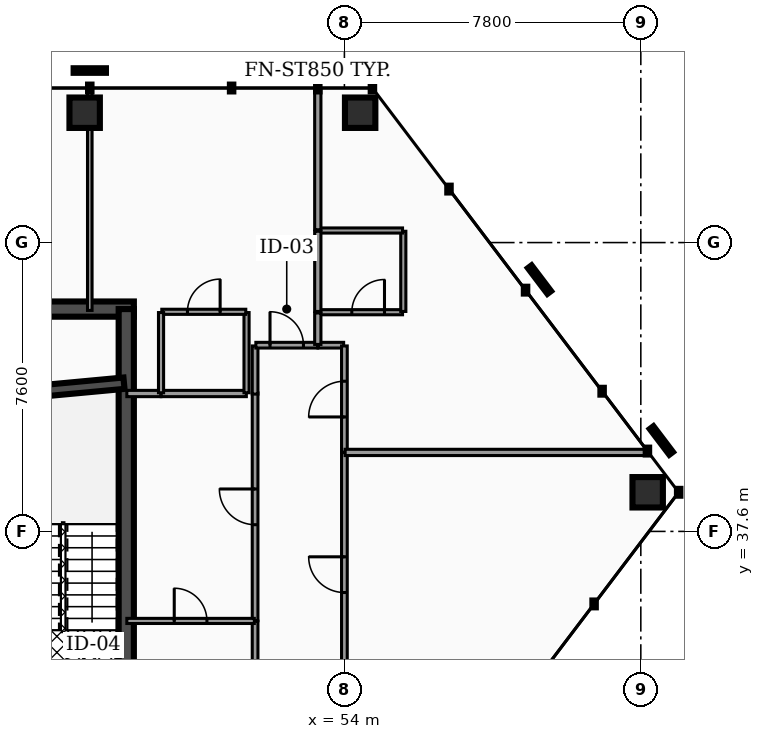
"""IFC4 building model, lengths in metres.
Left out: names, types, materials, properties, quantities, classifications, styles, units other than length and angle.
Written with IfcOpenShell. Run it as: python <this file> out.ifc"""

import sys

from ifc_helpers import new_model, si_unit, direction, frame, frame_2d, origin, origin_2d, place, context, subcontext, project, spatial, rectangle, hollow_rectangle, extrude, element, fill, save


model = new_model("IFC4")
c1 = context("Model", 3, precision=1e-05, world=origin(), true_north=direction((0.0, 1.0)))
c2 = subcontext(c1, "Body", "Model", "MODEL_VIEW")
j1 = project(units=[si_unit("LENGTHUNIT", "METRE"), si_unit("PLANEANGLEUNIT", "RADIAN")], contexts=[c1])
p1 = place(None, origin())
s1 = spatial("IfcSite", under=j1, at=p1, CompositionType="ELEMENT")
p2 = place(p1, origin())
s2 = spatial("IfcBuilding", under=s1, at=p2, CompositionType="ELEMENT")
p3 = place(p2, frame((0.0, 0.0, 130.9)))
s3 = spatial("IfcBuildingStorey", under=s2, at=p3, CompositionType="ELEMENT", Elevation=130.9)
p4 = place(p3, frame((28.4, 43.45, 0.0), z_axis=(0.0, 0.0, 1.0), x_axis=(1.0, 0.0, 0.0)))
e1 = element("IfcWall", 1, at=p4, inside=s3, PredefinedType="SHEAR", context=c2, shape_type="SweptSolid", body=[
    extrude(rectangle(XDim=20.06, YDim=0.4, at=frame_2d((10.03, 0.0))), origin(), (0.0, 0.0, 1.0), 3.5),
])
p5 = place(p3, frame((48.26, 33.25, 0.0), z_axis=(0.0, 0.0, 1.0), x_axis=(0.0, 1.0, 0.0)))
e2 = element("IfcWall", 2, at=p5, inside=s3, PredefinedType="SHEAR", context=c2, shape_type="SweptSolid", body=[
    extrude(rectangle(XDim=10.2, YDim=0.4, at=frame_2d((5.1, 0.0))), origin(), (0.0, 0.0, 1.0), 3.5),
])
p6 = place(p3, frame((44.98, 41.2, 0.0), z_axis=(0.0, 0.0, 1.0), x_axis=(0.995686468965, 0.09278176286, 0.0)))
e3 = element("IfcWall", 3, at=p6, inside=s3, PredefinedType="SHEAR", context=c2, shape_type="SweptSolid", body=[
    extrude(rectangle(XDim=3.234, YDim=0.3, at=frame_2d((1.617, 0.0))), origin(), (0.0, 0.0, 1.0), 3.5),
])
p7 = place(p3, frame((54.415, 48.617, 0.0), z_axis=(0.127574507632, -0.033051823658, 0.99127812543), x_axis=(0.250798276179, 0.968039371444, 0.0)))
e4 = element("IfcColumn", 4, at=p7, inside=s3, PredefinedType="COLUMN", context=c2, shape_type="SweptSolid", body=[
    extrude(hollow_rectangle(XDim=0.8, YDim=0.8, WallThickness=0.04, at=origin_2d()), origin(), (0.0, 0.0, 1.0), 3.531),
])
p8 = place(p3, frame((47.165, 48.617, 0.0), z_axis=(0.05984805099, -0.03326438183, 0.997653091858), x_axis=(0.485815509524, 0.874061376967, 0.0)))
e5 = element("IfcColumn", 5, at=p8, inside=s3, PredefinedType="COLUMN", context=c2, shape_type="SweptSolid", body=[
    extrude(hollow_rectangle(XDim=0.8, YDim=0.8, WallThickness=0.04, at=origin_2d()), origin(), (0.0, 0.0, 1.0), 3.508),
])
p9 = place(p3, frame((58.209, 33.651, 0.0), z_axis=(-0.008764028326, 0.074911575455, 0.997151667336), x_axis=(-0.993225936587, -0.116199134642, 0.0)))
e6 = element("IfcColumn", 6, at=p9, inside=s3, PredefinedType="COLUMN", context=c2, shape_type="SweptSolid", body=[
    extrude(hollow_rectangle(XDim=0.8, YDim=0.8, WallThickness=0.04, at=origin_2d()), origin(), (0.0, 0.0, 1.0), 3.51),
])
p10 = place(p3, frame((61.981, 38.629, 0.0), z_axis=(0.01871421422, 0.11089904723, 0.993655463181), x_axis=(-0.986058770777, 0.166397417569, 0.0)))
e7 = element("IfcColumn", 7, at=p10, inside=s3, PredefinedType="COLUMN", context=c2, shape_type="SweptSolid", body=[
    extrude(hollow_rectangle(XDim=0.8, YDim=0.8, WallThickness=0.04, at=origin_2d()), origin(), (0.0, 0.0, 1.0), 3.522),
])
p11 = place(p3, frame((54.0, 33.25, 0.0), z_axis=(0.0, 0.0, 1.0), x_axis=(0.0, 1.0, 0.0)))
e8 = element("IfcWall", 8, at=p11, inside=s3, PredefinedType="PARTITIONING", context=c2, shape_type="SweptSolid", body=[
    extrude(rectangle(XDim=6.423, YDim=0.15, at=frame_2d((3.212, 0.0))), origin(), (0.0, 0.0, 1.0), 2.457),
])
p12 = place(p11, frame((2.742, 0.0, 0.0)))
e9 = element("IfcOpeningElement", 9, at=p12, cuts=e8, PredefinedType="OPENING", context=c2, shape_type="SweptSolid", body=[
    extrude(rectangle(XDim=0.94, YDim=2.05, at=frame_2d((0.47, 1.025))), frame((0.0, 0.085, 0.0), z_axis=(0.0, -1.0, 0.0), x_axis=(1.0, 0.0, 0.0)), (0.0, 0.0, 1.0), 0.17),
])
p13 = place(p3, frame((53.305, 42.5, 0.0), z_axis=(0.0, 0.0, 1.0), x_axis=(1.0, 0.0, 0.0)))
e10 = element("IfcWall", 10, at=p13, inside=s3, PredefinedType="PARTITIONING", context=c2, shape_type="SweptSolid", body=[
    extrude(rectangle(XDim=0.675, YDim=0.15, at=frame_2d((0.337, 0.0))), origin(), (0.0, 0.0, 1.0), 2.457),
])
p14 = place(p3, frame((54.0, 39.683, 0.0), z_axis=(0.0, 0.0, 1.0), x_axis=(0.0, 1.0, 0.0)))
e11 = element("IfcWall", 11, at=p14, inside=s3, PredefinedType="PARTITIONING", context=c2, shape_type="SweptSolid", body=[
    extrude(rectangle(XDim=2.797, YDim=0.15, at=frame_2d((1.398, 0.0))), origin(), (0.0, 0.0, 1.0), 2.457),
])
p15 = place(p14, frame((0.928, 0.0, 0.0)))
e12 = element("IfcOpeningElement", 12, at=p15, cuts=e11, PredefinedType="OPENING", context=c2, shape_type="SweptSolid", body=[
    extrude(rectangle(XDim=0.94, YDim=2.05, at=frame_2d((0.47, 1.025))), frame((0.0, 0.085, 0.0), z_axis=(0.0, -1.0, 0.0), x_axis=(1.0, 0.0, 0.0)), (0.0, 0.0, 1.0), 0.17),
])
p16 = place(p3, frame((51.65, 35.25, 0.0), z_axis=(0.0, 0.0, 1.0), x_axis=(0.0, 1.0, 0.0)))
e13 = element("IfcWall", 13, at=p16, inside=s3, PredefinedType="PARTITIONING", context=c2, shape_type="SweptSolid", body=[
    extrude(rectangle(XDim=5.994, YDim=0.15, at=frame_2d((2.997, 0.0))), origin(), (0.0, 0.0, 1.0), 2.457),
])
p17 = place(p16, frame((2.527, 0.0, 0.0)))
e14 = element("IfcOpeningElement", 14, at=p17, cuts=e13, PredefinedType="OPENING", context=c2, shape_type="SweptSolid", body=[
    extrude(rectangle(XDim=0.94, YDim=2.05, at=frame_2d((0.47, 1.025))), frame((0.0, 0.085, 0.0), z_axis=(0.0, -1.0, 0.0), x_axis=(1.0, 0.0, 0.0)), (0.0, 0.0, 1.0), 0.17),
])
p18 = place(p3, frame((51.65, 33.27, 0.0), z_axis=(0.0, 0.0, 1.0), x_axis=(0.0, 1.0, 0.0)))
e15 = element("IfcWall", 15, at=p18, inside=s3, PredefinedType="PARTITIONING", context=c2, shape_type="SweptSolid", body=[
    extrude(rectangle(XDim=1.969, YDim=0.15, at=frame_2d((0.985, 0.0))), origin(), (0.0, 0.0, 1.0), 2.457),
])
p19 = place(p3, frame((51.65, 41.213, 0.0), z_axis=(0.0, 0.0, 1.0), x_axis=(0.0, 1.0, 0.0)))
e16 = element("IfcWall", 16, at=p19, inside=s3, PredefinedType="PARTITIONING", context=c2, shape_type="SweptSolid", body=[
    extrude(rectangle(XDim=1.267, YDim=0.15, at=frame_2d((0.633, 0.0))), origin(), (0.0, 0.0, 1.0), 2.457),
])
p20 = place(p3, frame((51.67, 42.5, 0.0), z_axis=(0.0, 0.0, 1.0), x_axis=(1.0, 0.0, 0.0)))
e17 = element("IfcWall", 17, at=p20, inside=s3, PredefinedType="PARTITIONING", context=c2, shape_type="SweptSolid", body=[
    extrude(rectangle(XDim=1.625, YDim=0.15, at=frame_2d((0.812, 0.0))), origin(), (0.0, 0.0, 1.0), 2.457),
])
p21 = place(p20, frame((0.373, 0.0, 0.0)))
e18 = element("IfcOpeningElement", 18, at=p21, cuts=e17, PredefinedType="OPENING", context=c2, shape_type="SweptSolid", body=[
    extrude(rectangle(XDim=0.88, YDim=2.05, at=frame_2d((0.44, 1.025))), frame((0.0, 0.085, 0.0), z_axis=(0.0, -1.0, 0.0), x_axis=(1.0, 0.0, 0.0)), (0.0, 0.0, 1.0), 0.17),
])
p22 = place(p3, frame((47.3, 43.415, 0.0), z_axis=(0.0, 0.0, 1.0), x_axis=(0.0, 1.0, 0.0)))
e19 = element("IfcWall", 19, at=p22, inside=s3, PredefinedType="PARTITIONING", context=c2, shape_type="SweptSolid", body=[
    extrude(rectangle(XDim=5.837, YDim=0.12, at=frame_2d((2.918, 0.0))), origin(), (0.0, 0.0, 1.0), 2.457),
])
p23 = place(p3, frame((54.02, 39.678, 0.0), z_axis=(0.0, 0.0, 1.0), x_axis=(1.0, 0.0, 0.0)))
e20 = element("IfcWall", 20, at=p23, inside=s3, PredefinedType="PARTITIONING", context=c2, shape_type="SweptSolid", body=[
    extrude(rectangle(XDim=7.967, YDim=0.165, at=frame_2d((3.983, 0.0))), origin(), (0.0, 0.0, 1.0), 2.457),
])
p24 = place(p3, frame((53.32, 43.367, 0.0), z_axis=(0.0, 0.0, 1.0), x_axis=(1.0, 0.0, 0.0)))
e21 = element("IfcWall", 21, at=p24, inside=s3, PredefinedType="PARTITIONING", context=c2, shape_type="SweptSolid", body=[
    extrude(rectangle(XDim=2.21, YDim=0.135, at=frame_2d((1.105, 0.0))), origin(), (0.0, 0.0, 1.0), 2.457),
])
p25 = place(p24, frame((0.875, 0.0, 0.0)))
e22 = element("IfcOpeningElement", 22, at=p25, cuts=e21, PredefinedType="OPENING", context=c2, shape_type="SweptSolid", body=[
    extrude(rectangle(XDim=0.86, YDim=2.05, at=frame_2d((0.43, 1.025))), frame((0.0, 0.077, 0.0), z_axis=(0.0, -1.0, 0.0), x_axis=(1.0, 0.0, 0.0)), (0.0, 0.0, 1.0), 0.155),
])
p26 = place(p3, frame((55.55, 43.387, 0.0), z_axis=(0.0, 0.0, 1.0), x_axis=(0.0, 1.0, 0.0)))
e23 = element("IfcWall", 23, at=p26, inside=s3, PredefinedType="PARTITIONING", context=c2, shape_type="SweptSolid", body=[
    extrude(rectangle(XDim=2.11, YDim=0.135, at=frame_2d((1.055, 0.0))), origin(), (0.0, 0.0, 1.0), 2.457),
])
p27 = place(p3, frame((53.32, 45.518, 0.0), z_axis=(0.0, 0.0, 1.0), x_axis=(1.0, 0.0, 0.0)))
e24 = element("IfcWall", 24, at=p27, inside=s3, PredefinedType="PARTITIONING", context=c2, shape_type="SweptSolid", body=[
    extrude(rectangle(XDim=2.21, YDim=0.135, at=frame_2d((1.105, 0.0))), origin(), (0.0, 0.0, 1.0), 2.457),
])
p28 = place(p3, frame((53.3, 42.52, 0.0), z_axis=(0.0, 0.0, 1.0), x_axis=(0.0, 1.0, 0.0)))
e25 = element("IfcWall", 25, at=p28, inside=s3, PredefinedType="PARTITIONING", context=c2, shape_type="SweptSolid", body=[
    extrude(rectangle(XDim=0.827, YDim=0.165, at=frame_2d((0.414, 0.0))), origin(), (0.0, 0.0, 1.0), 2.457),
])
p29 = place(p3, frame((53.3, 45.538, 0.0), z_axis=(0.0, 0.0, 1.0), x_axis=(0.0, 1.0, 0.0)))
e26 = element("IfcWall", 26, at=p29, inside=s3, PredefinedType="PARTITIONING", context=c2, shape_type="SweptSolid", body=[
    extrude(rectangle(XDim=3.714, YDim=0.165, at=frame_2d((1.857, 0.0))), origin(), (0.0, 0.0, 1.0), 2.457),
])
p30 = place(p3, frame((53.3, 43.387, 0.0), z_axis=(0.0, 0.0, 1.0), x_axis=(0.0, 1.0, 0.0)))
e27 = element("IfcWall", 27, at=p30, inside=s3, PredefinedType="PARTITIONING", context=c2, shape_type="SweptSolid", body=[
    extrude(rectangle(XDim=2.11, YDim=0.165, at=frame_2d((1.055, 0.0))), origin(), (0.0, 0.0, 1.0), 2.457),
])
p31 = place(p3, frame((48.275, 35.245, 0.0), z_axis=(0.0, 0.0, 1.0), x_axis=(1.0, 0.0, 0.0)))
e28 = element("IfcWall", 28, at=p31, inside=s3, PredefinedType="PARTITIONING", context=c2, shape_type="SweptSolid", body=[
    extrude(rectangle(XDim=3.355, YDim=0.135, at=frame_2d((1.677, 0.0))), origin(), (0.0, 0.0, 1.0), 2.457),
])
p32 = place(p31, frame((1.248, 0.0, 0.0)))
e29 = element("IfcOpeningElement", 29, at=p32, cuts=e28, PredefinedType="OPENING", context=c2, shape_type="SweptSolid", body=[
    extrude(rectangle(XDim=0.86, YDim=2.05, at=frame_2d((0.43, 1.025))), frame((0.0, 0.077, 0.0), z_axis=(0.0, -1.0, 0.0), x_axis=(1.0, 0.0, 0.0)), (0.0, 0.0, 1.0), 0.155),
])
p33 = place(p3, frame((48.275, 41.228, 0.0), z_axis=(0.0, 0.0, 1.0), x_axis=(1.0, 0.0, 0.0)))
e30 = element("IfcWall", 30, at=p33, inside=s3, PredefinedType="PARTITIONING", context=c2, shape_type="SweptSolid", body=[
    extrude(rectangle(XDim=0.895, YDim=0.165, at=frame_2d((0.448, 0.0))), origin(), (0.0, 0.0, 1.0), 2.457),
])
p34 = place(p3, frame((49.18, 41.228, 0.0), z_axis=(0.0, 0.0, 1.0), x_axis=(1.0, 0.0, 0.0)))
e31 = element("IfcWall", 31, at=p34, inside=s3, PredefinedType="PARTITIONING", context=c2, shape_type="SweptSolid", body=[
    extrude(rectangle(XDim=2.24, YDim=0.165, at=frame_2d((1.12, 0.0))), origin(), (0.0, 0.0, 1.0), 2.457),
])
p35 = place(p3, frame((51.425, 41.248, 0.0), z_axis=(0.0, 0.0, 1.0), x_axis=(0.0, 1.0, 0.0)))
e32 = element("IfcWall", 32, at=p35, inside=s3, PredefinedType="PARTITIONING", context=c2, shape_type="SweptSolid", body=[
    extrude(rectangle(XDim=2.11, YDim=0.135, at=frame_2d((1.055, 0.0))), origin(), (0.0, 0.0, 1.0), 2.457),
])
p36 = place(p3, frame((49.195, 43.378, 0.0), z_axis=(0.0, 0.0, 1.0), x_axis=(1.0, 0.0, 0.0)))
e33 = element("IfcWall", 33, at=p36, inside=s3, PredefinedType="PARTITIONING", context=c2, shape_type="SweptSolid", body=[
    extrude(rectangle(XDim=2.21, YDim=0.135, at=frame_2d((1.105, 0.0))), origin(), (0.0, 0.0, 1.0), 2.457),
])
p37 = place(p36, frame((0.675, 0.0, 0.0)))
e34 = element("IfcOpeningElement", 34, at=p37, cuts=e33, PredefinedType="OPENING", context=c2, shape_type="SweptSolid", body=[
    extrude(rectangle(XDim=0.86, YDim=2.05, at=frame_2d((0.43, 1.025))), frame((0.0, 0.077, 0.0), z_axis=(0.0, -1.0, 0.0), x_axis=(1.0, 0.0, 0.0)), (0.0, 0.0, 1.0), 0.155),
])
p38 = place(p3, frame((49.175, 41.248, 0.0), z_axis=(0.0, 0.0, 1.0), x_axis=(0.0, 1.0, 0.0)))
e35 = element("IfcWall", 35, at=p38, inside=s3, PredefinedType="PARTITIONING", context=c2, shape_type="SweptSolid", body=[
    extrude(rectangle(XDim=2.11, YDim=0.135, at=frame_2d((1.055, 0.0))), origin(), (0.0, 0.0, 1.0), 2.457),
])
p39 = place(p12, origin())
e36 = element("IfcDoor", 36, at=p39, inside=s3, OperationType="SINGLE_SWING_RIGHT", PredefinedType="DOOR", context=c2, shape_type="SweptSolid", body=[
    extrude(rectangle(XDim=0.94, YDim=2.05, at=frame_2d((0.47, 1.025))), frame((0.0, 0.025, 0.0), z_axis=(0.0, -1.0, 0.0), x_axis=(1.0, 0.0, 0.0)), (0.0, 0.0, 1.0), 0.05),
])
fill(e9, e36)
p40 = place(p15, origin())
e37 = element("IfcDoor", 37, at=p40, inside=s3, OperationType="SINGLE_SWING_LEFT", PredefinedType="DOOR", context=c2, shape_type="SweptSolid", body=[
    extrude(rectangle(XDim=0.94, YDim=2.05, at=frame_2d((0.47, 1.025))), frame((0.0, 0.025, 0.0), z_axis=(0.0, -1.0, 0.0), x_axis=(1.0, 0.0, 0.0)), (0.0, 0.0, 1.0), 0.05),
])
fill(e12, e37)
p41 = place(p17, origin())
e38 = element("IfcDoor", 38, at=p41, inside=s3, OperationType="SINGLE_SWING_RIGHT", PredefinedType="DOOR", context=c2, shape_type="SweptSolid", body=[
    extrude(rectangle(XDim=0.94, YDim=2.05, at=frame_2d((0.47, 1.025))), frame((0.0, 0.025, 0.0), z_axis=(0.0, -1.0, 0.0), x_axis=(1.0, 0.0, 0.0)), (0.0, 0.0, 1.0), 0.05),
])
fill(e14, e38)
p42 = place(p21, origin())
e39 = element("IfcDoor", 39, at=p42, inside=s3, OperationType="SINGLE_SWING_LEFT", PredefinedType="DOOR", context=c2, shape_type="SweptSolid", body=[
    extrude(rectangle(XDim=0.88, YDim=2.05, at=frame_2d((0.44, 1.025))), frame((0.0, 0.025, 0.0), z_axis=(0.0, -1.0, 0.0), x_axis=(1.0, 0.0, 0.0)), (0.0, 0.0, 1.0), 0.05),
])
fill(e18, e39)
p43 = place(p25, origin())
e40 = element("IfcDoor", 40, at=p43, inside=s3, OperationType="SINGLE_SWING_RIGHT", PredefinedType="DOOR", context=c2, shape_type="SweptSolid", body=[
    extrude(rectangle(XDim=0.86, YDim=2.05, at=frame_2d((0.43, 1.025))), frame((0.0, 0.025, 0.0), z_axis=(0.0, -1.0, 0.0), x_axis=(1.0, 0.0, 0.0)), (0.0, 0.0, 1.0), 0.05),
])
fill(e22, e40)
p44 = place(p32, origin())
e41 = element("IfcDoor", 41, at=p44, inside=s3, OperationType="SINGLE_SWING_LEFT", PredefinedType="DOOR", context=c2, shape_type="SweptSolid", body=[
    extrude(rectangle(XDim=0.86, YDim=2.05, at=frame_2d((0.43, 1.025))), frame((0.0, 0.025, 0.0), z_axis=(0.0, -1.0, 0.0), x_axis=(1.0, 0.0, 0.0)), (0.0, 0.0, 1.0), 0.05),
])
fill(e29, e41)
p45 = place(p37, origin())
e42 = element("IfcDoor", 42, at=p45, inside=s3, OperationType="SINGLE_SWING_RIGHT", PredefinedType="DOOR", context=c2, shape_type="SweptSolid", body=[
    extrude(rectangle(XDim=0.86, YDim=2.05, at=frame_2d((0.43, 1.025))), frame((0.0, 0.025, 0.0), z_axis=(0.0, -1.0, 0.0), x_axis=(1.0, 0.0, 0.0)), (0.0, 0.0, 1.0), 0.05),
])
fill(e34, e42)
save(model, sys.argv[1])
